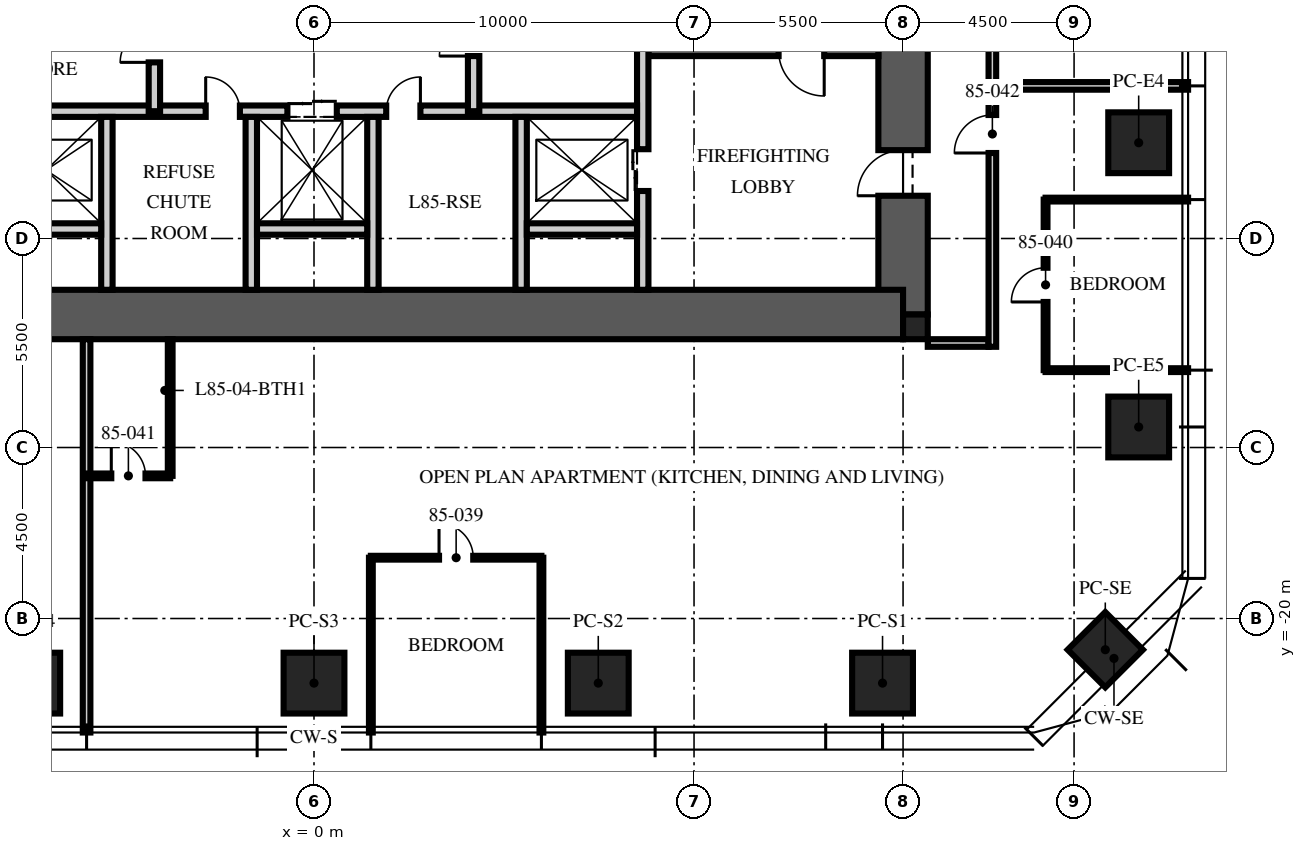
"""IFC4 building model, lengths in metres.
Left out: names, types, materials, properties, quantities, classifications, styles, units other than length and angle.
Written with IfcOpenShell. Run it as: python <this file> out.ifc"""

import sys

from ifc_helpers import new_model, si_unit, direction, frame, frame_2d, origin, origin_2d, place, context, subcontext, project, spatial, rectangle, extrude, element, fill, save


model = new_model("IFC4")
c1 = context("Model", 3, precision=1e-05, world=origin(), true_north=direction((0.0, 1.0)))
c2 = subcontext(c1, "Body", "Model", "MODEL_VIEW")
j1 = project(units=[si_unit("LENGTHUNIT", "METRE"), si_unit("PLANEANGLEUNIT", "RADIAN")], contexts=[c1])
p1 = place(None, origin())
s1 = spatial("IfcSite", under=j1, at=p1, CompositionType="ELEMENT")
p2 = place(p1, origin())
s2 = spatial("IfcBuilding", under=s1, at=p2, CompositionType="ELEMENT")
p3 = place(p2, frame((0.0, 0.0, 338.25)))
s3 = spatial("IfcBuildingStorey", under=s2, at=p3, CompositionType="ELEMENT", Elevation=338.25)
p4 = place(p3, frame((15.5, -12.0, -0.25), z_axis=(0.0, 0.0, 1.0), x_axis=(0.0, 1.0, 0.0)))
e1 = element("IfcWall", 1, at=p4, inside=s3, PredefinedType="SHEAR", context=c2, shape_type="SweptSolid", body=[
    extrude(rectangle(XDim=24.0, YDim=1.3, at=frame_2d((12.0, 0.0))), origin(), (0.0, 0.0, 1.0), 3.75),
])
p5 = place(p4, frame((3.125, 0.0, 0.25)))
e2 = element("IfcOpeningElement", 2, at=p5, cuts=e1, PredefinedType="OPENING", context=c2, shape_type="SweptSolid", body=[
    extrude(rectangle(XDim=1.2, YDim=2.1, at=frame_2d((0.6, 1.05))), frame((0.0, 0.66, 0.0), z_axis=(0.0, -1.0, 0.0), x_axis=(1.0, 0.0, 0.0)), (0.0, 0.0, 1.0), 1.32),
])
p6 = place(p4, frame((19.375, 0.0, 0.25)))
e3 = element("IfcOpeningElement", 3, at=p6, cuts=e1, PredefinedType="OPENING", context=c2, shape_type="SweptSolid", body=[
    extrude(rectangle(XDim=1.8, YDim=2.1, at=frame_2d((0.9, 1.05))), frame((0.0, 0.66, 0.0), z_axis=(0.0, -1.0, 0.0), x_axis=(1.0, 0.0, 0.0)), (0.0, 0.0, 1.0), 1.32),
])
p7 = place(p3, frame((-15.5, -12.0, -0.25), z_axis=(0.0, 0.0, 1.0), x_axis=(1.0, 0.0, 0.0)))
e4 = element("IfcWall", 4, at=p7, inside=s3, PredefinedType="SHEAR", context=c2, shape_type="SweptSolid", body=[
    extrude(rectangle(XDim=31.0, YDim=1.3, at=frame_2d((15.5, 0.0))), origin(), (0.0, 0.0, 1.0), 3.75),
])
p8 = place(p3, frame((15.825, -12.325, -0.25), z_axis=(0.0, 0.0, 1.0), x_axis=(1.0, 0.0, 0.0)))
e5 = element("IfcColumn", 5, at=p8, inside=s3, PredefinedType="COLUMN", context=c2, shape_type="SweptSolid", body=[
    extrude(rectangle(XDim=0.65, YDim=0.65, at=origin_2d()), origin(), (0.0, 0.0, 1.0), 3.75),
])
for number, where, z_axis, x_axis in (
    (6, (21.7, -7.48, 0.0), (0.0, 0.0, 1.0), (0.0, 1.0, 0.0)),
    (7, (21.7, -14.96, 0.0), (0.0, 0.0, 1.0), (0.0, 1.0, 0.0)),
    (8, (14.96, -21.7, 0.0), (0.0, 0.0, 1.0), (1.0, 0.0, 0.0)),
    (9, (7.48, -21.7, 0.0), (0.0, 0.0, 1.0), (1.0, 0.0, 0.0)),
    (10, (0.0, -21.7, 0.0), (0.0, 0.0, 1.0), (1.0, 0.0, 0.0)),
    (11, (-7.48, -21.7, 0.0), (0.0, 0.0, 1.0), (1.0, 0.0, 0.0)),
):
    element("IfcColumn", number, at=place(p3, frame(where, z_axis=z_axis, x_axis=x_axis)), inside=s3, PredefinedType="COLUMN", context=c2, shape_type="SweptSolid", body=[
        extrude(rectangle(XDim=1.6, YDim=1.6, at=origin_2d()), origin(), (0.0, 0.0, 1.0), 3.75),
    ])
p9 = place(p3, frame((20.821, -20.821, 0.0), z_axis=(0.0, 0.0, 1.0), x_axis=(0.707106781187, 0.707106781187, 0.0)))
e12 = element("IfcColumn", 12, at=p9, inside=s3, PredefinedType="COLUMN", context=c2, shape_type="SweptSolid", body=[
    extrude(rectangle(XDim=1.4, YDim=1.4, at=origin_2d()), origin(), (0.0, 0.0, 1.0), 3.75),
])
p10 = place(p3, frame((14.85, -5.05, 0.0), z_axis=(0.0, 0.0, 1.0), x_axis=(-1.0, 0.0, 0.0)))
e13 = element("IfcWall", 13, at=p10, inside=s3, PredefinedType="SOLIDWALL", context=c2, shape_type="SweptSolid", body=[
    extrude(rectangle(XDim=6.05, YDim=0.3, at=frame_2d((3.025, 0.0))), origin(), (0.0, 0.0, 1.0), 3.5),
])
p11 = place(p10, frame((1.425, 0.0, 0.0)))
e14 = element("IfcOpeningElement", 14, at=p11, cuts=e13, PredefinedType="OPENING", context=c2, shape_type="SweptSolid", body=[
    extrude(rectangle(XDim=1.2, YDim=2.1, at=frame_2d((0.6, 1.05))), frame((0.0, 0.16, 0.0), z_axis=(0.0, -1.0, 0.0), x_axis=(1.0, 0.0, 0.0)), (0.0, 0.0, 1.0), 0.32),
])
p12 = place(p3, frame((8.65, -11.35, 0.0), z_axis=(0.0, 0.0, 1.0), x_axis=(0.0, 1.0, 0.0)))
e15 = element("IfcWall", 15, at=p12, inside=s3, PredefinedType="PARTITIONING", context=c2, shape_type="SweptSolid", body=[
    extrude(rectangle(XDim=6.45, YDim=0.3, at=frame_2d((3.225, 0.0))), origin(), (0.0, 0.0, 1.0), 3.5),
])
p13 = place(p12, frame((2.6, 0.0, 0.0)))
e16 = element("IfcOpeningElement", 16, at=p13, cuts=e15, PredefinedType="OPENING", context=c2, shape_type="SweptSolid", body=[
    extrude(rectangle(XDim=1.1, YDim=2.1, at=frame_2d((0.55, 1.05))), frame((0.0, 0.16, 0.0), z_axis=(0.0, -1.0, 0.0), x_axis=(1.0, 0.0, 0.0)), (0.0, 0.0, 1.0), 0.32),
])
p14 = place(p3, frame((-8.5, -6.65, 0.0), z_axis=(0.0, 0.0, 1.0), x_axis=(1.0, 0.0, 0.0)))
e17 = element("IfcWall", 17, at=p14, inside=s3, PredefinedType="PARTITIONING", context=c2, shape_type="SweptSolid", body=[
    extrude(rectangle(XDim=17.0, YDim=0.3, at=frame_2d((8.5, 0.0))), origin(), (0.0, 0.0, 1.0), 3.5),
])
p15 = place(p14, frame((7.8, 0.0, 0.0)))
e18 = element("IfcOpeningElement", 18, at=p15, cuts=e17, PredefinedType="OPENING", context=c2, shape_type="SweptSolid", body=[
    extrude(rectangle(XDim=1.3, YDim=2.4, at=frame_2d((0.65, 1.2))), frame((0.0, 0.16, 0.0), z_axis=(0.0, -1.0, 0.0), x_axis=(1.0, 0.0, 0.0)), (0.0, 0.0, 1.0), 0.32),
])
p16 = place(p14, frame((5.65, 0.0, 0.0)))
e19 = element("IfcOpeningElement", 19, at=p16, cuts=e17, PredefinedType="OPENING", context=c2, shape_type="SweptSolid", body=[
    extrude(rectangle(XDim=0.9, YDim=2.1, at=frame_2d((0.45, 1.05))), frame((0.0, 0.16, 0.0), z_axis=(0.0, -1.0, 0.0), x_axis=(1.0, 0.0, 0.0)), (0.0, 0.0, 1.0), 0.32),
])
p17 = place(p14, frame((10.4, 0.0, 0.0)))
e20 = element("IfcOpeningElement", 20, at=p17, cuts=e17, PredefinedType="OPENING", context=c2, shape_type="SweptSolid", body=[
    extrude(rectangle(XDim=0.9, YDim=2.1, at=frame_2d((0.45, 1.05))), frame((0.0, 0.16, 0.0), z_axis=(0.0, -1.0, 0.0), x_axis=(1.0, 0.0, 0.0)), (0.0, 0.0, 1.0), 0.32),
])
for number, where, z_axis, x_axis in (
    (21, (-5.45, -11.35, 0.0), (0.0, 0.0, 1.0), (0.0, 1.0, 0.0)),
    (22, (-1.65, -11.35, 0.0), (0.0, 0.0, 1.0), (0.0, 1.0, 0.0)),
    (23, (1.55, -11.35, 0.0), (0.0, 0.0, 1.0), (0.0, 1.0, 0.0)),
    (24, (5.45, -11.35, 0.0), (0.0, 0.0, 1.0), (0.0, 1.0, 0.0)),
):
    element("IfcWall", number, at=place(p3, frame(where, z_axis=z_axis, x_axis=x_axis)), inside=s3, PredefinedType="PARTITIONING", context=c2, shape_type="SweptSolid", body=[
        extrude(rectangle(XDim=4.55, YDim=0.3, at=frame_2d((2.275, 0.0))), origin(), (0.0, 0.0, 1.0), 3.5),
    ])
for number, where, z_axis, x_axis in (
    (25, (-8.5, -9.75, 0.0), (0.0, 0.0, 1.0), (1.0, 0.0, 0.0)),
    (26, (-1.5, -9.75, 0.0), (0.0, 0.0, 1.0), (1.0, 0.0, 0.0)),
    (27, (5.6, -9.75, 0.0), (0.0, 0.0, 1.0), (1.0, 0.0, 0.0)),
):
    element("IfcWall", number, at=place(p3, frame(where, z_axis=z_axis, x_axis=x_axis)), inside=s3, PredefinedType="PARTITIONING", context=c2, shape_type="SweptSolid", body=[
        extrude(rectangle(XDim=2.9, YDim=0.3, at=frame_2d((1.45, 0.0))), origin(), (0.0, 0.0, 1.0), 3.5),
    ])
p18 = place(p3, frame((-4.2, -6.65, 0.0), z_axis=(0.0, 0.0, 1.0), x_axis=(0.0, 1.0, 0.0)))
e28 = element("IfcWall", 28, at=p18, inside=s3, PredefinedType="PARTITIONING", context=c2, shape_type="SweptSolid", body=[
    extrude(rectangle(XDim=8.45, YDim=0.3, at=frame_2d((4.225, 0.0))), origin(), (0.0, 0.0, 1.0), 3.5),
])
p19 = place(p18, frame((1.285, 0.0, 0.0)))
e29 = element("IfcOpeningElement", 29, at=p19, cuts=e28, PredefinedType="OPENING", context=c2, shape_type="SweptSolid", body=[
    extrude(rectangle(XDim=0.9, YDim=2.1, at=frame_2d((0.45, 1.05))), frame((0.0, 0.16, 0.0), z_axis=(0.0, -1.0, 0.0), x_axis=(1.0, 0.0, 0.0)), (0.0, 0.0, 1.0), 0.32),
])
p20 = place(p18, frame((5.51, 0.0, 0.0)))
e30 = element("IfcOpeningElement", 30, at=p20, cuts=e28, PredefinedType="OPENING", context=c2, shape_type="SweptSolid", body=[
    extrude(rectangle(XDim=0.9, YDim=2.1, at=frame_2d((0.45, 1.05))), frame((0.0, 0.16, 0.0), z_axis=(0.0, -1.0, 0.0), x_axis=(1.0, 0.0, 0.0)), (0.0, 0.0, 1.0), 0.32),
])
p21 = place(p3, frame((4.2, -6.65, 0.0), z_axis=(0.0, 0.0, 1.0), x_axis=(0.0, 1.0, 0.0)))
e31 = element("IfcWall", 31, at=p21, inside=s3, PredefinedType="PARTITIONING", context=c2, shape_type="SweptSolid", body=[
    extrude(rectangle(XDim=8.45, YDim=0.3, at=frame_2d((4.225, 0.0))), origin(), (0.0, 0.0, 1.0), 3.5),
])
p22 = place(p21, frame((1.451, 0.0, 0.0)))
e32 = element("IfcOpeningElement", 32, at=p22, cuts=e31, PredefinedType="OPENING", context=c2, shape_type="SweptSolid", body=[
    extrude(rectangle(XDim=0.9, YDim=2.1, at=frame_2d((0.45, 1.05))), frame((0.0, 0.16, 0.0), z_axis=(0.0, -1.0, 0.0), x_axis=(1.0, 0.0, 0.0)), (0.0, 0.0, 1.0), 0.32),
])
p23 = place(p21, frame((5.676, 0.0, 0.0)))
e33 = element("IfcOpeningElement", 33, at=p23, cuts=e31, PredefinedType="OPENING", context=c2, shape_type="SweptSolid", body=[
    extrude(rectangle(XDim=0.9, YDim=2.1, at=frame_2d((0.45, 1.05))), frame((0.0, 0.16, 0.0), z_axis=(0.0, -1.0, 0.0), x_axis=(1.0, 0.0, 0.0)), (0.0, 0.0, 1.0), 0.32),
])
p24 = place(p3, frame((16.15, -12.75, 0.0), z_axis=(0.0, 0.0, 1.0), x_axis=(1.0, 0.0, 0.0)))
e34 = element("IfcWall", 34, at=p24, inside=s3, PredefinedType="PARTITIONING", context=c2, shape_type="SweptSolid", body=[
    extrude(rectangle(XDim=1.6, YDim=0.2, at=frame_2d((0.8, 0.0))), origin(), (0.0, 0.0, 1.0), 2.6),
])
p25 = place(p3, frame((17.95, -5.984, 0.0), z_axis=(0.0, 0.0, 1.0), x_axis=(1.0, 0.0, 0.0)))
e35 = element("IfcWall", 35, at=p25, inside=s3, PredefinedType="PARTITIONING", context=c2, shape_type="SweptSolid", body=[
    extrude(rectangle(XDim=5.05, YDim=0.2, at=frame_2d((2.525, 0.0))), origin(), (0.0, 0.0, 1.0), 3.01),
])
p26 = place(p3, frame((-5.984, -12.65, 0.0), z_axis=(0.0, 0.0, 1.0), x_axis=(0.0, -1.0, 0.0)))
e36 = element("IfcWall", 36, at=p26, inside=s3, PredefinedType="PARTITIONING", context=c2, shape_type="SweptSolid", body=[
    extrude(rectangle(XDim=10.35, YDim=0.2, at=frame_2d((5.175, 0.0))), origin(), (0.0, 0.0, 1.0), 3.01),
])
for number, where, z_axis, x_axis in (
    (37, (1.496, -18.4, 0.0), (0.0, 0.0, 1.0), (0.0, -1.0, 0.0)),
    (38, (5.984, -18.4, 0.0), (0.0, 0.0, 1.0), (0.0, -1.0, 0.0)),
):
    element("IfcWall", number, at=place(p3, frame(where, z_axis=z_axis, x_axis=x_axis)), inside=s3, PredefinedType="PARTITIONING", context=c2, shape_type="SweptSolid", body=[
        extrude(rectangle(XDim=4.6, YDim=0.1, at=frame_2d((2.3, 0.0))), origin(), (0.0, 0.0, 1.0), 3.01),
    ])
for number, where, z_axis, x_axis in (
    (39, (19.25, -13.464, 0.0), (0.0, 0.0, 1.0), (1.0, 0.0, 0.0)),
    (40, (19.25, -8.976, 0.0), (0.0, 0.0, 1.0), (1.0, 0.0, 0.0)),
):
    element("IfcWall", number, at=place(p3, frame(where, z_axis=z_axis, x_axis=x_axis)), inside=s3, PredefinedType="PARTITIONING", context=c2, shape_type="SweptSolid", body=[
        extrude(rectangle(XDim=3.75, YDim=0.1, at=frame_2d((1.875, 0.0))), origin(), (0.0, 0.0, 1.0), 3.01),
    ])
p27 = place(p3, frame((1.496, -18.4, 0.0), z_axis=(0.0, 0.0, 1.0), x_axis=(1.0, 0.0, 0.0)))
e41 = element("IfcWall", 41, at=p27, inside=s3, PredefinedType="PARTITIONING", context=c2, shape_type="SweptSolid", body=[
    extrude(rectangle(XDim=4.488, YDim=0.1, at=frame_2d((2.244, 0.0))), origin(), (0.0, 0.0, 1.0), 2.91),
])
p28 = place(p27, frame((1.794, 0.0, 0.0)))
e42 = element("IfcOpeningElement", 42, at=p28, cuts=e41, PredefinedType="OPENING", context=c2, shape_type="SweptSolid", body=[
    extrude(rectangle(XDim=0.9, YDim=2.1, at=frame_2d((0.45, 1.05))), frame((0.0, 0.06, 0.0), z_axis=(0.0, -1.0, 0.0), x_axis=(1.0, 0.0, 0.0)), (0.0, 0.0, 1.0), 0.12),
])
p29 = place(p3, frame((19.25, -13.464, 0.0), z_axis=(0.0, 0.0, 1.0), x_axis=(0.0, 1.0, 0.0)))
e43 = element("IfcWall", 43, at=p29, inside=s3, PredefinedType="PARTITIONING", context=c2, shape_type="SweptSolid", body=[
    extrude(rectangle(XDim=4.488, YDim=0.1, at=frame_2d((2.244, 0.0))), origin(), (0.0, 0.0, 1.0), 2.91),
])
p30 = place(p29, frame((1.794, 0.0, 0.0)))
e44 = element("IfcOpeningElement", 44, at=p30, cuts=e43, PredefinedType="OPENING", context=c2, shape_type="SweptSolid", body=[
    extrude(rectangle(XDim=0.9, YDim=2.1, at=frame_2d((0.45, 1.05))), frame((0.0, 0.06, 0.0), z_axis=(0.0, -1.0, 0.0), x_axis=(1.0, 0.0, 0.0)), (0.0, 0.0, 1.0), 0.12),
])
p31 = place(p3, frame((-5.984, -16.246, 0.0), z_axis=(0.0, 0.0, 1.0), x_axis=(1.0, 0.0, 0.0)))
e45 = element("IfcWall", 45, at=p31, inside=s3, PredefinedType="PARTITIONING", context=c2, shape_type="SweptSolid", body=[
    extrude(rectangle(XDim=2.2, YDim=0.125, at=frame_2d((1.1, 0.0))), origin(), (0.0, 0.0, 1.0), 2.91),
])
p32 = place(p31, frame((0.65, 0.0, 0.0)))
e46 = element("IfcOpeningElement", 46, at=p32, cuts=e45, PredefinedType="OPENING", context=c2, shape_type="SweptSolid", body=[
    extrude(rectangle(XDim=0.9, YDim=2.1, at=frame_2d((0.45, 1.05))), frame((0.0, 0.073, 0.0), z_axis=(0.0, -1.0, 0.0), x_axis=(1.0, 0.0, 0.0)), (0.0, 0.0, 1.0), 0.145),
])
p33 = place(p3, frame((-3.784, -12.65, 0.0), z_axis=(0.0, 0.0, 1.0), x_axis=(0.0, -1.0, 0.0)))
e47 = element("IfcWall", 47, at=p33, inside=s3, PredefinedType="PARTITIONING", context=c2, shape_type="SweptSolid", body=[
    extrude(rectangle(XDim=3.596, YDim=0.125, at=frame_2d((1.798, 0.0))), origin(), (0.0, 0.0, 1.0), 2.91),
])
p34 = place(p3, frame((17.85, -12.85, 0.0), z_axis=(0.0, 0.0, 1.0), x_axis=(0.0, 1.0, 0.0)))
e48 = element("IfcWall", 48, at=p34, inside=s3, PredefinedType="PARTITIONING", context=c2, shape_type="SweptSolid", body=[
    extrude(rectangle(XDim=25.7, YDim=0.2, at=frame_2d((12.85, 0.0))), origin(), (0.0, 0.0, 1.0), 2.9),
])
p35 = place(p34, frame((23.386, 0.0, 0.0)))
e49 = element("IfcOpeningElement", 49, at=p35, cuts=e48, PredefinedType="OPENING", context=c2, shape_type="SweptSolid", body=[
    extrude(rectangle(XDim=1.0, YDim=2.2, at=frame_2d((0.5, 1.1))), frame((0.0, 0.11, 0.0), z_axis=(0.0, -1.0, 0.0), x_axis=(1.0, 0.0, 0.0)), (0.0, 0.0, 1.0), 0.22),
])
p36 = place(p34, frame((5.1, 0.0, 0.0)))
e50 = element("IfcOpeningElement", 50, at=p36, cuts=e48, PredefinedType="OPENING", context=c2, shape_type="SweptSolid", body=[
    extrude(rectangle(XDim=1.0, YDim=2.2, at=frame_2d((0.5, 1.1))), frame((0.0, 0.11, 0.0), z_axis=(0.0, -1.0, 0.0), x_axis=(1.0, 0.0, 0.0)), (0.0, 0.0, 1.0), 0.22),
])
p37 = place(p5, origin())
e51 = element("IfcDoor", 51, at=p37, inside=s3, OperationType="SINGLE_SWING_LEFT", PredefinedType="DOOR", context=c2, shape_type="SweptSolid", body=[
    extrude(rectangle(XDim=1.2, YDim=2.1, at=frame_2d((0.6, 1.05))), frame((0.0, 0.025, 0.0), z_axis=(0.0, -1.0, 0.0), x_axis=(1.0, 0.0, 0.0)), (0.0, 0.0, 1.0), 0.05),
])
fill(e2, e51)
p38 = place(p13, origin())
e52 = element("IfcDoor", 52, at=p38, inside=s3, OperationType="DOUBLE_DOOR_SLIDING", PredefinedType="DOOR", context=c2, shape_type="SweptSolid", body=[
    extrude(rectangle(XDim=1.1, YDim=2.1, at=frame_2d((0.55, 1.05))), frame((0.0, 0.025, 0.0), z_axis=(0.0, -1.0, 0.0), x_axis=(1.0, 0.0, 0.0)), (0.0, 0.0, 1.0), 0.05),
])
fill(e16, e52)
p39 = place(p15, origin())
e53 = element("IfcDoor", 53, at=p39, inside=s3, OperationType="DOUBLE_DOOR_SLIDING", PredefinedType="DOOR", context=c2, shape_type="SweptSolid", body=[
    extrude(rectangle(XDim=1.3, YDim=2.4, at=frame_2d((0.65, 1.2))), frame((0.0, 0.025, 0.0), z_axis=(0.0, -1.0, 0.0), x_axis=(1.0, 0.0, 0.0)), (0.0, 0.0, 1.0), 0.05),
])
fill(e18, e53)
p40 = place(p16, origin())
e54 = element("IfcDoor", 54, at=p40, inside=s3, OperationType="SINGLE_SWING_LEFT", PredefinedType="DOOR", context=c2, shape_type="SweptSolid", body=[
    extrude(rectangle(XDim=0.9, YDim=2.1, at=frame_2d((0.45, 1.05))), frame((0.0, 0.025, 0.0), z_axis=(0.0, -1.0, 0.0), x_axis=(1.0, 0.0, 0.0)), (0.0, 0.0, 1.0), 0.05),
])
fill(e19, e54)
p41 = place(p17, origin())
e55 = element("IfcDoor", 55, at=p41, inside=s3, OperationType="SINGLE_SWING_RIGHT", PredefinedType="DOOR", context=c2, shape_type="SweptSolid", body=[
    extrude(rectangle(XDim=0.9, YDim=2.1, at=frame_2d((0.45, 1.05))), frame((0.0, 0.025, 0.0), z_axis=(0.0, -1.0, 0.0), x_axis=(1.0, 0.0, 0.0)), (0.0, 0.0, 1.0), 0.05),
])
fill(e20, e55)
p42 = place(p19, origin())
e56 = element("IfcDoor", 56, at=p42, inside=s3, OperationType="SINGLE_SWING_LEFT", PredefinedType="DOOR", context=c2, shape_type="SweptSolid", body=[
    extrude(rectangle(XDim=0.9, YDim=2.1, at=frame_2d((0.45, 1.05))), frame((0.0, 0.025, 0.0), z_axis=(0.0, -1.0, 0.0), x_axis=(1.0, 0.0, 0.0)), (0.0, 0.0, 1.0), 0.05),
])
fill(e29, e56)
p43 = place(p22, origin())
e57 = element("IfcDoor", 57, at=p43, inside=s3, OperationType="SINGLE_SWING_LEFT", PredefinedType="DOOR", context=c2, shape_type="SweptSolid", body=[
    extrude(rectangle(XDim=0.9, YDim=2.1, at=frame_2d((0.45, 1.05))), frame((0.0, 0.025, 0.0), z_axis=(0.0, -1.0, 0.0), x_axis=(1.0, 0.0, 0.0)), (0.0, 0.0, 1.0), 0.05),
])
fill(e32, e57)
p44 = place(p28, origin())
e58 = element("IfcDoor", 58, at=p44, inside=s3, OperationType="SINGLE_SWING_LEFT", PredefinedType="DOOR", context=c2, shape_type="SweptSolid", body=[
    extrude(rectangle(XDim=0.9, YDim=2.1, at=frame_2d((0.45, 1.05))), frame((0.0, 0.025, 0.0), z_axis=(0.0, -1.0, 0.0), x_axis=(1.0, 0.0, 0.0)), (0.0, 0.0, 1.0), 0.05),
])
fill(e42, e58)
p45 = place(p30, origin())
e59 = element("IfcDoor", 59, at=p45, inside=s3, OperationType="SINGLE_SWING_LEFT", PredefinedType="DOOR", context=c2, shape_type="SweptSolid", body=[
    extrude(rectangle(XDim=0.9, YDim=2.1, at=frame_2d((0.45, 1.05))), frame((0.0, 0.025, 0.0), z_axis=(0.0, -1.0, 0.0), x_axis=(1.0, 0.0, 0.0)), (0.0, 0.0, 1.0), 0.05),
])
fill(e44, e59)
p46 = place(p32, origin())
e60 = element("IfcDoor", 60, at=p46, inside=s3, OperationType="SINGLE_SWING_LEFT", PredefinedType="DOOR", context=c2, shape_type="SweptSolid", body=[
    extrude(rectangle(XDim=0.9, YDim=2.1, at=frame_2d((0.45, 1.05))), frame((0.0, 0.025, 0.0), z_axis=(0.0, -1.0, 0.0), x_axis=(1.0, 0.0, 0.0)), (0.0, 0.0, 1.0), 0.05),
])
fill(e46, e60)
p47 = place(p36, origin())
e61 = element("IfcDoor", 61, at=p47, inside=s3, OperationType="SINGLE_SWING_LEFT", PredefinedType="DOOR", context=c2, shape_type="SweptSolid", body=[
    extrude(rectangle(XDim=1.0, YDim=2.2, at=frame_2d((0.5, 1.1))), frame((0.0, 0.025, 0.0), z_axis=(0.0, -1.0, 0.0), x_axis=(1.0, 0.0, 0.0)), (0.0, 0.0, 1.0), 0.05),
])
fill(e50, e61)
save(model, sys.argv[1])
